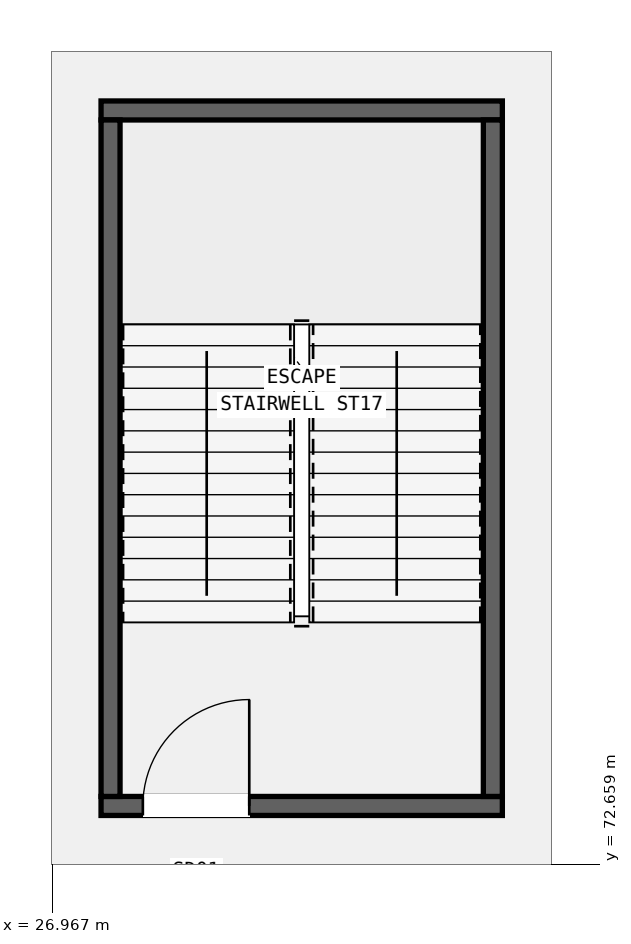
"""IFC4 building model, lengths in metres.
Left out: names, types, materials, properties, quantities, classifications, styles, units other than length and angle.
Written with IfcOpenShell. Run it as: python <this file> out.ifc"""

import sys

from ifc_helpers import new_model, si_unit, direction, frame, frame_2d, origin, place, context, subcontext, project, spatial, rectangle, extrude, element, fill, save


model = new_model("IFC4")
c1 = context("Model", 3, precision=1e-05, world=origin(), true_north=direction((0.0, 1.0)))
c2 = subcontext(c1, "Body", "Model", "MODEL_VIEW")
j1 = project(units=[si_unit("LENGTHUNIT", "METRE"), si_unit("PLANEANGLEUNIT", "RADIAN")], contexts=[c1])
p1 = place(None, origin())
s1 = spatial("IfcSite", under=j1, at=p1, CompositionType="ELEMENT")
p2 = place(p1, origin())
s2 = spatial("IfcBuilding", under=s1, at=p2, CompositionType="ELEMENT")
p3 = place(p2, frame((0.0, 0.0, 15.3)))
s3 = spatial("IfcBuildingStorey", under=s2, at=p3, CompositionType="ELEMENT", Elevation=15.3)
p4 = place(p3, frame((27.61, 73.425, 0.0), z_axis=(0.0, 0.0, 1.0), x_axis=(1.0, 0.0, 0.0)))
e1 = element("IfcWall", 1, at=p4, inside=s3, PredefinedType="SHEAR", context=c2, shape_type="SweptSolid", body=[
    extrude(rectangle(XDim=5.28, YDim=0.25, at=frame_2d((2.64, 0.0))), origin(), (0.0, 0.0, 1.0), 4.86),
])
p5 = place(p4, frame((0.55, 0.0, 0.0)))
e2 = element("IfcOpeningElement", 2, at=p5, cuts=e1, PredefinedType="OPENING", context=c2, shape_type="SweptSolid", body=[
    extrude(rectangle(XDim=1.4, YDim=2.15, at=frame_2d((0.7, 1.075))), frame((0.0, 0.135, 0.0), z_axis=(0.0, -1.0, 0.0), x_axis=(1.0, 0.0, 0.0)), (0.0, 0.0, 1.0), 0.27),
])
p6 = place(p3, frame((27.61, 82.575, 0.0), z_axis=(0.0, 0.0, 1.0), x_axis=(1.0, 0.0, 0.0)))
e3 = element("IfcWall", 3, at=p6, inside=s3, PredefinedType="SHEAR", context=c2, shape_type="SweptSolid", body=[
    extrude(rectangle(XDim=5.28, YDim=0.25, at=frame_2d((2.64, 0.0))), origin(), (0.0, 0.0, 1.0), 4.86),
])
for number, where, z_axis, x_axis in (
    (4, (27.735, 73.55, 0.0), (0.0, 0.0, 1.0), (0.0, 1.0, 0.0)),
    (5, (32.765, 73.55, 0.0), (0.0, 0.0, 1.0), (0.0, 1.0, 0.0)),
):
    element("IfcWall", number, at=place(p3, frame(where, z_axis=z_axis, x_axis=x_axis)), inside=s3, PredefinedType="SHEAR", context=c2, shape_type="SweptSolid", body=[
        extrude(rectangle(XDim=8.9, YDim=0.25, at=frame_2d((4.45, 0.0))), origin(), (0.0, 0.0, 1.0), 4.86),
    ])
p7 = place(p5, origin())
e6 = element("IfcDoor", 6, at=p7, inside=s3, OperationType="SINGLE_SWING_RIGHT", PredefinedType="DOOR", context=c2, shape_type="SweptSolid", body=[
    extrude(rectangle(XDim=1.4, YDim=2.15, at=frame_2d((0.7, 1.075))), frame((0.0, 0.025, 0.0), z_axis=(0.0, -1.0, 0.0), x_axis=(1.0, 0.0, 0.0)), (0.0, 0.0, 1.0), 0.05),
])
fill(e2, e6)
save(model, sys.argv[1])
